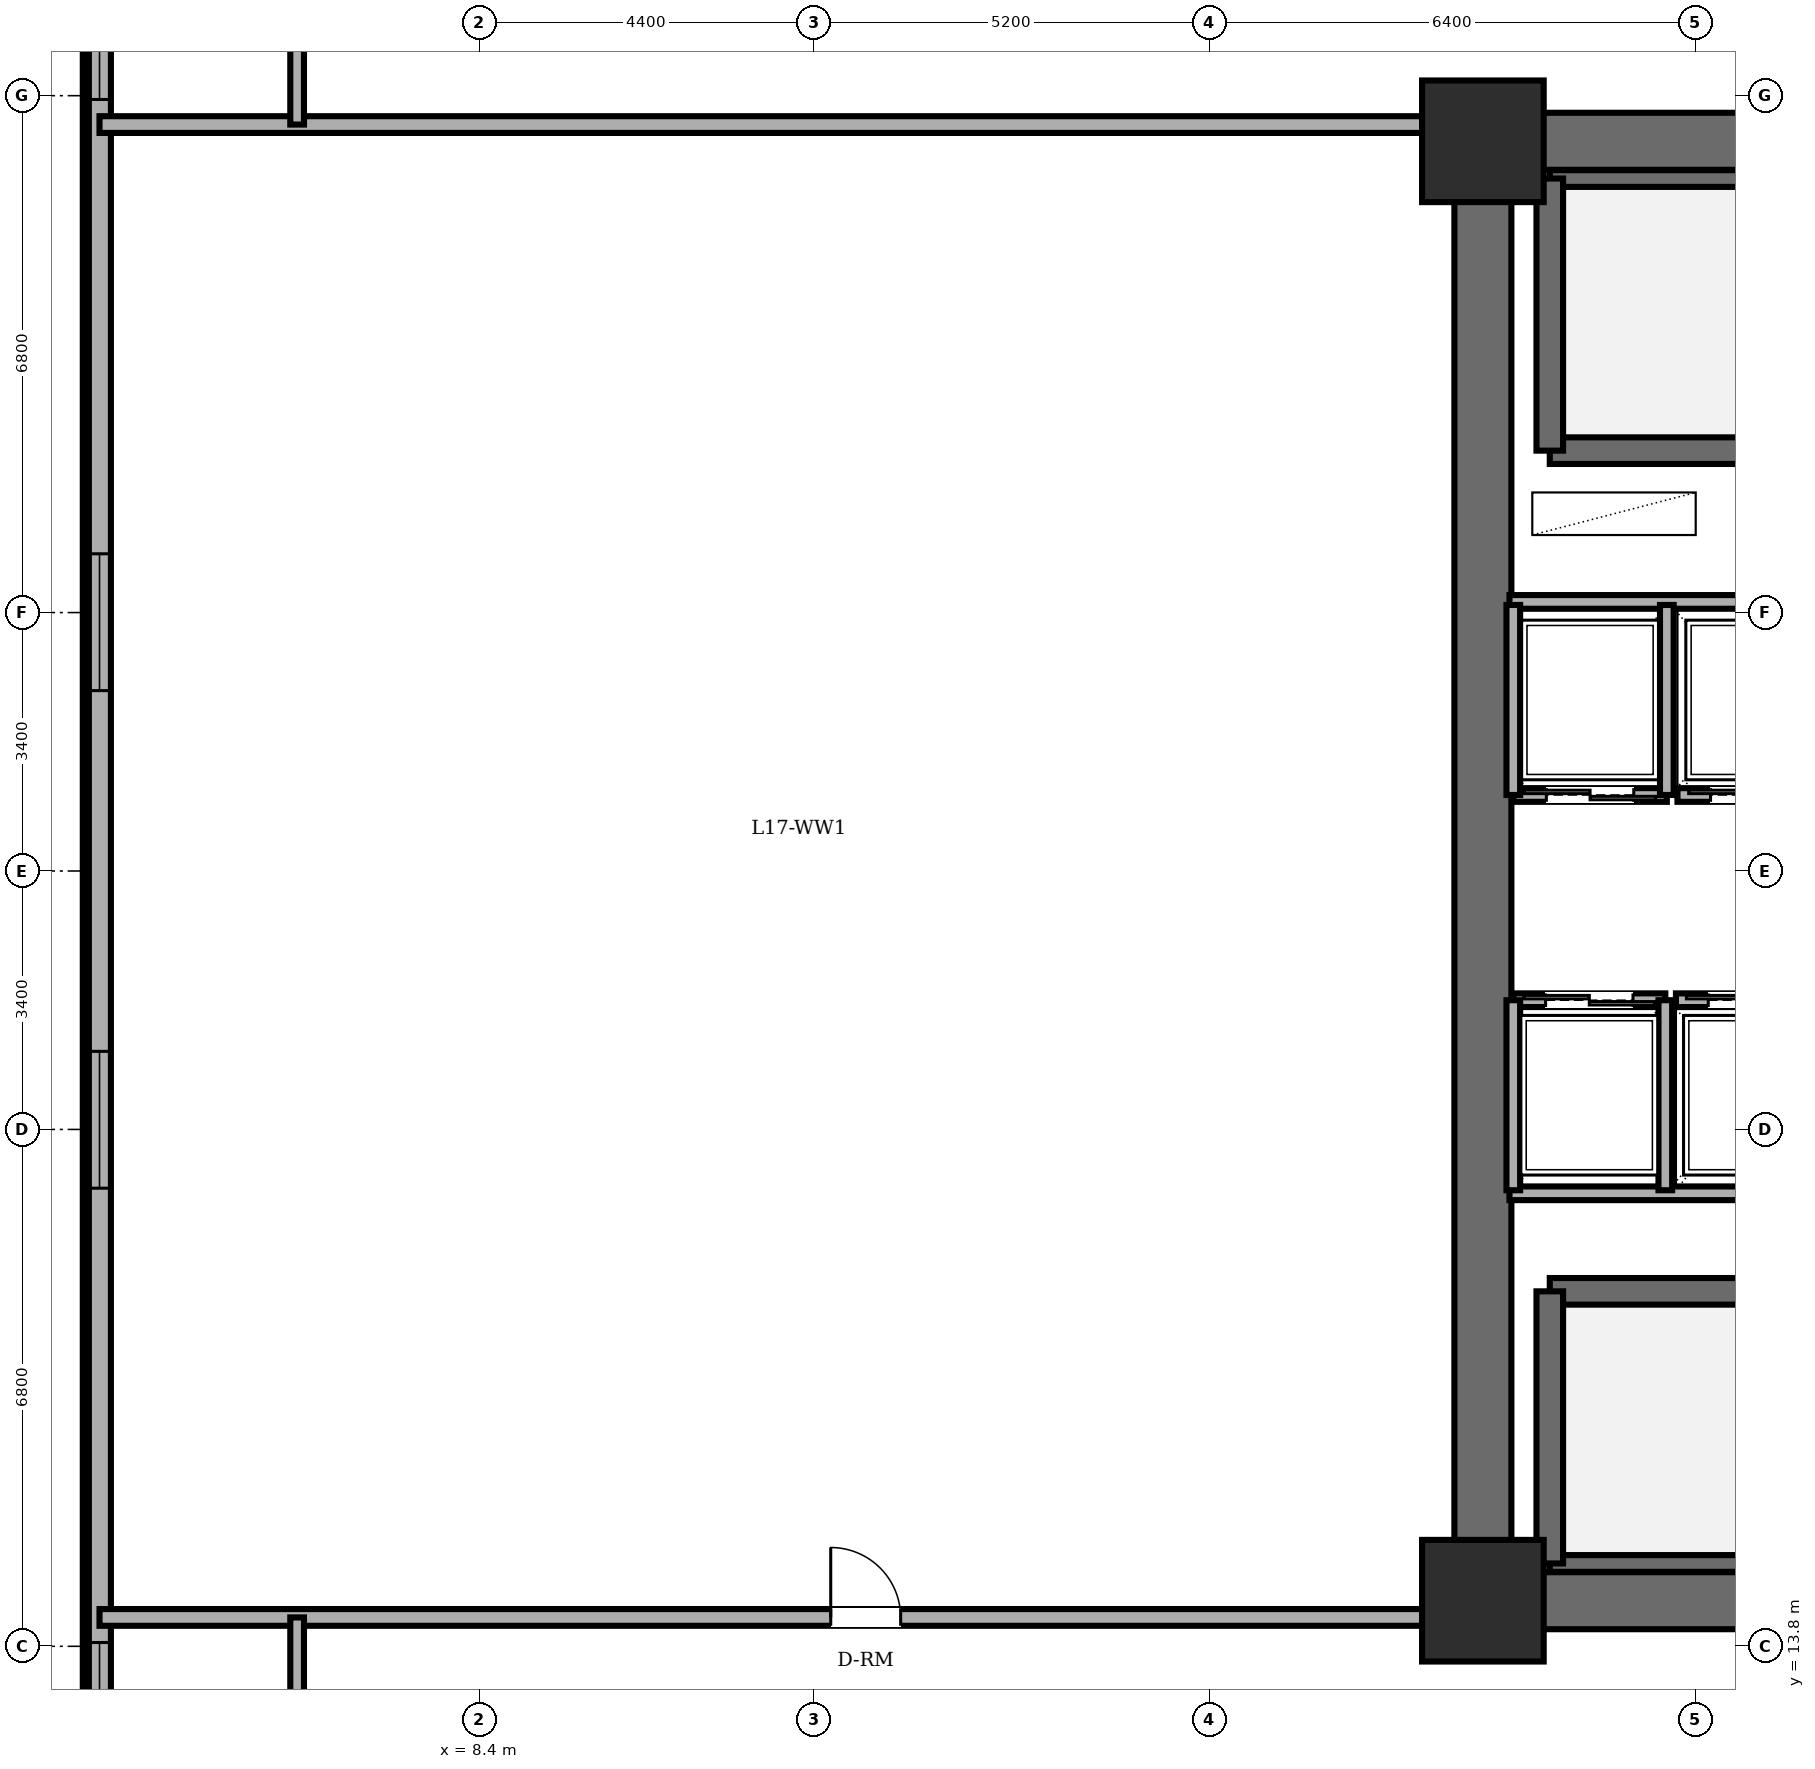
"""IFC4 building model, lengths in metres.
Left out: names, types, materials, properties, quantities, classifications, styles, units other than length and angle.
Written with IfcOpenShell. Run it as: python <this file> out.ifc"""

import sys

from ifc_helpers import new_model, si_unit, direction, frame, frame_2d, origin, origin_2d, place, context, subcontext, project, spatial, rectangle, extrude, element, fill, save


model = new_model("IFC4")
c1 = context("Model", 3, precision=1e-05, world=origin(), true_north=direction((0.0, 1.0)))
c2 = subcontext(c1, "Body", "Model", "MODEL_VIEW")
j1 = project(units=[si_unit("LENGTHUNIT", "METRE"), si_unit("PLANEANGLEUNIT", "RADIAN")], contexts=[c1])
p1 = place(None, origin())
s1 = spatial("IfcSite", under=j1, at=p1, CompositionType="ELEMENT")
p2 = place(p1, origin())
s2 = spatial("IfcBuilding", under=s1, at=p2, CompositionType="ELEMENT")
p3 = place(p2, frame((0.0, 0.0, 64.8)))
s3 = spatial("IfcBuildingStorey", under=s2, at=p3, CompositionType="ELEMENT", Elevation=64.8)
for number, where, z_axis, x_axis in (
    (1, (21.6, 14.4, 0.0), (0.0, 0.0, 1.0), (1.0, 0.0, 0.0)),
    (2, (21.6, 33.6, 0.0), (0.0, 0.0, 1.0), (1.0, 0.0, 0.0)),
):
    element("IfcColumn", number, at=place(p3, frame(where, z_axis=z_axis, x_axis=x_axis)), inside=s3, PredefinedType="COLUMN", context=c2, shape_type="SweptSolid", body=[
        extrude(rectangle(XDim=1.6, YDim=1.6, at=origin_2d()), origin(), (0.0, 0.0, 1.0), 3.6),
    ])
p4 = place(p3, frame((3.4, 40.2, 0.0), z_axis=(0.0, 0.0, 1.0), x_axis=(0.0, -1.0, 0.0)))
e3 = element("IfcWall", 3, at=p4, inside=s3, PredefinedType="SOLIDWALL", context=c2, shape_type="SweptSolid", body=[
    extrude(rectangle(XDim=32.4, YDim=0.3, at=frame_2d((16.2, 0.0))), origin(), (0.0, 0.0, 1.0), 3.4),
])
p5 = place(p4, frame((1.235, 0.0, 0.85)))
e4 = element("IfcOpeningElement", 4, at=p5, cuts=e3, PredefinedType="OPENING", context=c2, shape_type="SweptSolid", body=[
    extrude(rectangle(XDim=1.8, YDim=1.55, at=frame_2d((0.9, 0.775))), frame((0.0, 0.16, 0.0), z_axis=(0.0, -1.0, 0.0), x_axis=(1.0, 0.0, 0.0)), (0.0, 0.0, 1.0), 0.32),
])
p6 = place(p4, frame((4.25, 0.0, 0.85)))
e5 = element("IfcOpeningElement", 5, at=p6, cuts=e3, PredefinedType="OPENING", context=c2, shape_type="SweptSolid", body=[
    extrude(rectangle(XDim=1.8, YDim=1.55, at=frame_2d((0.9, 0.775))), frame((0.0, 0.16, 0.0), z_axis=(0.0, -1.0, 0.0), x_axis=(1.0, 0.0, 0.0)), (0.0, 0.0, 1.0), 0.32),
])
p7 = place(p4, frame((12.027, 0.0, 0.85)))
e6 = element("IfcOpeningElement", 6, at=p7, cuts=e3, PredefinedType="OPENING", context=c2, shape_type="SweptSolid", body=[
    extrude(rectangle(XDim=1.8, YDim=1.55, at=frame_2d((0.9, 0.775))), frame((0.0, 0.16, 0.0), z_axis=(0.0, -1.0, 0.0), x_axis=(1.0, 0.0, 0.0)), (0.0, 0.0, 1.0), 0.32),
])
p8 = place(p4, frame((18.573, 0.0, 0.85)))
e7 = element("IfcOpeningElement", 7, at=p8, cuts=e3, PredefinedType="OPENING", context=c2, shape_type="SweptSolid", body=[
    extrude(rectangle(XDim=1.8, YDim=1.55, at=frame_2d((0.9, 0.775))), frame((0.0, 0.16, 0.0), z_axis=(0.0, -1.0, 0.0), x_axis=(1.0, 0.0, 0.0)), (0.0, 0.0, 1.0), 0.32),
])
p9 = place(p4, frame((26.35, 0.0, 0.85)))
e8 = element("IfcOpeningElement", 8, at=p9, cuts=e3, PredefinedType="OPENING", context=c2, shape_type="SweptSolid", body=[
    extrude(rectangle(XDim=1.8, YDim=1.55, at=frame_2d((0.9, 0.775))), frame((0.0, 0.16, 0.0), z_axis=(0.0, -1.0, 0.0), x_axis=(1.0, 0.0, 0.0)), (0.0, 0.0, 1.0), 0.32),
])
p10 = place(p4, frame((29.365, 0.0, 0.85)))
e9 = element("IfcOpeningElement", 9, at=p10, cuts=e3, PredefinedType="OPENING", context=c2, shape_type="SweptSolid", body=[
    extrude(rectangle(XDim=1.8, YDim=1.55, at=frame_2d((0.9, 0.775))), frame((0.0, 0.16, 0.0), z_axis=(0.0, -1.0, 0.0), x_axis=(1.0, 0.0, 0.0)), (0.0, 0.0, 1.0), 0.32),
])
p11 = place(p3, frame((21.6, 14.4, 0.0), z_axis=(0.0, 0.0, 1.0), x_axis=(0.0, 1.0, 0.0)))
e10 = element("IfcWall", 10, at=p11, inside=s3, PredefinedType="SHEAR", context=c2, shape_type="SweptSolid", body=[
    extrude(rectangle(XDim=19.2, YDim=0.75, at=frame_2d((9.6, 0.0))), origin(), (0.0, 0.0, 1.0), 3.4),
])
for number, where, z_axis, x_axis in (
    (11, (21.6, 33.6, 0.0), (0.0, 0.0, 1.0), (1.0, 0.0, 0.0)),
    (12, (37.2, 14.4, 0.0), (0.0, 0.0, 1.0), (-1.0, 0.0, 0.0)),
):
    element("IfcWall", number, at=place(p3, frame(where, z_axis=z_axis, x_axis=x_axis)), inside=s3, PredefinedType="SHEAR", context=c2, shape_type="SweptSolid", body=[
        extrude(rectangle(XDim=15.6, YDim=0.75, at=frame_2d((7.8, 0.0))), origin(), (0.0, 0.0, 1.0), 3.4),
    ])
p12 = place(p3, frame((22.48, 29.53, 0.0), z_axis=(0.0, 0.0, 1.0), x_axis=(1.0, 0.0, 0.0)))
e13 = element("IfcWall", 13, at=p12, inside=s3, PredefinedType="SOLIDWALL", context=c2, shape_type="SweptSolid", body=[
    extrude(rectangle(XDim=7.79, YDim=0.35, at=frame_2d((3.895, 0.0))), origin(), (0.0, 0.0, 1.0), 3.4),
])
p13 = place(p3, frame((22.48, 33.11, 0.0), z_axis=(0.0, 0.0, 1.0), x_axis=(1.0, 0.0, 0.0)))
e14 = element("IfcWall", 14, at=p13, inside=s3, PredefinedType="PARTITIONING", context=c2, shape_type="SweptSolid", body=[
    extrude(rectangle(XDim=7.79, YDim=0.22, at=frame_2d((3.895, 0.0))), origin(), (0.0, 0.0, 1.0), 3.4),
])
p14 = place(p3, frame((22.48, 29.53, 0.0), z_axis=(0.0, 0.0, 1.0), x_axis=(0.0, 1.0, 0.0)))
e15 = element("IfcWall", 15, at=p14, inside=s3, PredefinedType="SOLIDWALL", context=c2, shape_type="SweptSolid", body=[
    extrude(rectangle(XDim=3.58, YDim=0.35, at=frame_2d((1.79, 0.0))), origin(), (0.0, 0.0, 1.0), 3.4),
])
p15 = place(p3, frame((22.48, 18.47, 0.0), z_axis=(0.0, 0.0, 1.0), x_axis=(1.0, 0.0, 0.0)))
e16 = element("IfcWall", 16, at=p15, inside=s3, PredefinedType="SOLIDWALL", context=c2, shape_type="SweptSolid", body=[
    extrude(rectangle(XDim=7.79, YDim=0.35, at=frame_2d((3.895, 0.0))), origin(), (0.0, 0.0, 1.0), 3.4),
])
p16 = place(p3, frame((22.48, 14.89, 0.0), z_axis=(0.0, 0.0, 1.0), x_axis=(1.0, 0.0, 0.0)))
e17 = element("IfcWall", 17, at=p16, inside=s3, PredefinedType="PARTITIONING", context=c2, shape_type="SweptSolid", body=[
    extrude(rectangle(XDim=7.79, YDim=0.22, at=frame_2d((3.895, 0.0))), origin(), (0.0, 0.0, 1.0), 3.4),
])
p17 = place(p3, frame((22.48, 14.89, 0.0), z_axis=(0.0, 0.0, 1.0), x_axis=(0.0, 1.0, 0.0)))
e18 = element("IfcWall", 18, at=p17, inside=s3, PredefinedType="SOLIDWALL", context=c2, shape_type="SweptSolid", body=[
    extrude(rectangle(XDim=3.58, YDim=0.35, at=frame_2d((1.79, 0.0))), origin(), (0.0, 0.0, 1.0), 3.4),
])
p18 = place(p3, frame((21.95, 27.54, 0.0), z_axis=(0.0, 0.0, 1.0), x_axis=(1.0, 0.0, 0.0)))
e19 = element("IfcWall", 19, at=p18, inside=s3, PredefinedType="PARTITIONING", context=c2, shape_type="SweptSolid", body=[
    extrude(rectangle(XDim=10.56, YDim=0.18, at=frame_2d((5.28, 0.0))), origin(), (0.0, 0.0, 1.0), 3.4),
])
p19 = place(p3, frame((21.95, 19.76, 0.0), z_axis=(0.0, 0.0, 1.0), x_axis=(1.0, 0.0, 0.0)))
e20 = element("IfcWall", 20, at=p19, inside=s3, PredefinedType="PARTITIONING", context=c2, shape_type="SweptSolid", body=[
    extrude(rectangle(XDim=14.87, YDim=0.18, at=frame_2d((7.435, 0.0))), origin(), (0.0, 0.0, 1.0), 3.4),
])
p20 = place(p3, frame((24.02, 25.0, 0.0), z_axis=(0.0, 0.0, 1.0), x_axis=(-1.0, 0.0, 0.0)))
e21 = element("IfcWall", 21, at=p20, inside=s3, PredefinedType="PARTITIONING", context=c2, shape_type="SweptSolid", body=[
    extrude(rectangle(XDim=2.02, YDim=0.18, at=frame_2d((1.01, 0.0))), origin(), (0.0, 0.0, 1.0), 3.4),
])
p21 = place(p20, frame((0.435, 0.0, 0.0)))
e22 = element("IfcOpeningElement", 22, at=p21, cuts=e21, PredefinedType="OPENING", context=c2, shape_type="SweptSolid", body=[
    extrude(rectangle(XDim=1.15, YDim=2.2, at=frame_2d((0.575, 1.1))), frame((0.0, 0.1, 0.0), z_axis=(0.0, -1.0, 0.0), x_axis=(1.0, 0.0, 0.0)), (0.0, 0.0, 1.0), 0.2),
])
for number, where, z_axis, x_axis in (
    (23, (24.02, 25.0, 0.0), (0.0, 0.0, 1.0), (0.0, 1.0, 0.0)),
    (24, (22.0, 27.5, 0.0), (0.0, 0.0, 1.0), (0.0, -1.0, 0.0)),
):
    element("IfcWall", number, at=place(p3, frame(where, z_axis=z_axis, x_axis=x_axis)), inside=s3, PredefinedType="PARTITIONING", context=c2, shape_type="SweptSolid", body=[
        extrude(rectangle(XDim=2.5, YDim=0.18, at=frame_2d((1.25, 0.0))), origin(), (0.0, 0.0, 1.0), 3.4),
    ])
p22 = place(p3, frame((26.18, 25.0, 0.0), z_axis=(0.0, 0.0, 1.0), x_axis=(-1.0, 0.0, 0.0)))
e25 = element("IfcWall", 25, at=p22, inside=s3, PredefinedType="PARTITIONING", context=c2, shape_type="SweptSolid", body=[
    extrude(rectangle(XDim=2.02, YDim=0.18, at=frame_2d((1.01, 0.0))), origin(), (0.0, 0.0, 1.0), 3.4),
])
p23 = place(p22, frame((0.435, 0.0, 0.0)))
e26 = element("IfcOpeningElement", 26, at=p23, cuts=e25, PredefinedType="OPENING", context=c2, shape_type="SweptSolid", body=[
    extrude(rectangle(XDim=1.15, YDim=2.2, at=frame_2d((0.575, 1.1))), frame((0.0, 0.1, 0.0), z_axis=(0.0, -1.0, 0.0), x_axis=(1.0, 0.0, 0.0)), (0.0, 0.0, 1.0), 0.2),
])
p24 = place(p3, frame((22.0, 22.3, 0.0), z_axis=(0.0, 0.0, 1.0), x_axis=(1.0, 0.0, 0.0)))
e27 = element("IfcWall", 27, at=p24, inside=s3, PredefinedType="PARTITIONING", context=c2, shape_type="SweptSolid", body=[
    extrude(rectangle(XDim=2.0, YDim=0.18, at=frame_2d((1.0, 0.0))), origin(), (0.0, 0.0, 1.0), 3.4),
])
p25 = place(p24, frame((0.425, 0.0, 0.0)))
e28 = element("IfcOpeningElement", 28, at=p25, cuts=e27, PredefinedType="OPENING", context=c2, shape_type="SweptSolid", body=[
    extrude(rectangle(XDim=1.15, YDim=2.2, at=frame_2d((0.575, 1.1))), frame((0.0, 0.1, 0.0), z_axis=(0.0, -1.0, 0.0), x_axis=(1.0, 0.0, 0.0)), (0.0, 0.0, 1.0), 0.2),
])
for number, where, z_axis, x_axis in (
    (29, (24.0, 19.8, 0.0), (0.0, 0.0, 1.0), (0.0, 1.0, 0.0)),
    (30, (22.0, 22.3, 0.0), (0.0, 0.0, 1.0), (0.0, -1.0, 0.0)),
):
    element("IfcWall", number, at=place(p3, frame(where, z_axis=z_axis, x_axis=x_axis)), inside=s3, PredefinedType="PARTITIONING", context=c2, shape_type="SweptSolid", body=[
        extrude(rectangle(XDim=2.5, YDim=0.18, at=frame_2d((1.25, 0.0))), origin(), (0.0, 0.0, 1.0), 3.4),
    ])
p26 = place(p3, frame((24.14, 22.3, 0.0), z_axis=(0.0, 0.0, 1.0), x_axis=(1.0, 0.0, 0.0)))
e31 = element("IfcWall", 31, at=p26, inside=s3, PredefinedType="PARTITIONING", context=c2, shape_type="SweptSolid", body=[
    extrude(rectangle(XDim=2.0, YDim=0.18, at=frame_2d((1.0, 0.0))), origin(), (0.0, 0.0, 1.0), 3.4),
])
p27 = place(p26, frame((0.425, 0.0, 0.0)))
e32 = element("IfcOpeningElement", 32, at=p27, cuts=e31, PredefinedType="OPENING", context=c2, shape_type="SweptSolid", body=[
    extrude(rectangle(XDim=1.15, YDim=2.2, at=frame_2d((0.575, 1.1))), frame((0.0, 0.1, 0.0), z_axis=(0.0, -1.0, 0.0), x_axis=(1.0, 0.0, 0.0)), (0.0, 0.0, 1.0), 0.2),
])
p28 = place(p3, frame((3.4, 14.18, 0.0), z_axis=(0.0, 0.0, 1.0), x_axis=(1.0, 0.0, 0.0)))
e33 = element("IfcWall", 33, at=p28, inside=s3, PredefinedType="PARTITIONING", context=c2, shape_type="SweptSolid", body=[
    extrude(rectangle(XDim=18.08, YDim=0.22, at=frame_2d((9.04, 0.0))), origin(), (0.0, 0.0, 1.0), 3.4),
])
p29 = place(p28, frame((9.62, 0.0, 0.0)))
e34 = element("IfcOpeningElement", 34, at=p29, cuts=e33, PredefinedType="OPENING", context=c2, shape_type="SweptSolid", body=[
    extrude(rectangle(XDim=0.92, YDim=2.1, at=frame_2d((0.46, 1.05))), frame((0.0, 0.12, 0.0), z_axis=(0.0, -1.0, 0.0), x_axis=(1.0, 0.0, 0.0)), (0.0, 0.0, 1.0), 0.24),
])
p30 = place(p3, frame((3.4, 33.82, 0.0), z_axis=(0.0, 0.0, 1.0), x_axis=(1.0, 0.0, 0.0)))
e35 = element("IfcWall", 35, at=p30, inside=s3, PredefinedType="PARTITIONING", context=c2, shape_type="SweptSolid", body=[
    extrude(rectangle(XDim=18.08, YDim=0.22, at=frame_2d((9.04, 0.0))), origin(), (0.0, 0.0, 1.0), 3.4),
])
for number, where, z_axis, x_axis in (
    (36, (6.0, 11.72, 0.0), (0.0, 0.0, 1.0), (0.0, 1.0, 0.0)),
    (37, (6.0, 33.82, 0.0), (0.0, 0.0, 1.0), (0.0, 1.0, 0.0)),
):
    element("IfcWall", number, at=place(p3, frame(where, z_axis=z_axis, x_axis=x_axis)), inside=s3, PredefinedType="PARTITIONING", context=c2, shape_type="SweptSolid", body=[
        extrude(rectangle(XDim=2.46, YDim=0.18, at=frame_2d((1.23, 0.0))), origin(), (0.0, 0.0, 1.0), 3.4),
    ])
p31 = place(p6, origin())
e38 = element("IfcWindow", 38, at=p31, inside=s3, PartitioningType="DOUBLE_PANEL_VERTICAL", PredefinedType="WINDOW", context=c2, shape_type="SweptSolid", body=[
    extrude(rectangle(XDim=1.8, YDim=1.55, at=frame_2d((0.9, 0.775))), frame((0.0, 0.03, 0.0), z_axis=(0.0, -1.0, 0.0), x_axis=(1.0, 0.0, 0.0)), (0.0, 0.0, 1.0), 0.06),
])
fill(e5, e38)
p32 = place(p7, origin())
e39 = element("IfcWindow", 39, at=p32, inside=s3, PartitioningType="DOUBLE_PANEL_VERTICAL", PredefinedType="WINDOW", context=c2, shape_type="SweptSolid", body=[
    extrude(rectangle(XDim=1.8, YDim=1.55, at=frame_2d((0.9, 0.775))), frame((0.0, 0.03, 0.0), z_axis=(0.0, -1.0, 0.0), x_axis=(1.0, 0.0, 0.0)), (0.0, 0.0, 1.0), 0.06),
])
fill(e6, e39)
p33 = place(p8, origin())
e40 = element("IfcWindow", 40, at=p33, inside=s3, PartitioningType="DOUBLE_PANEL_VERTICAL", PredefinedType="WINDOW", context=c2, shape_type="SweptSolid", body=[
    extrude(rectangle(XDim=1.8, YDim=1.55, at=frame_2d((0.9, 0.775))), frame((0.0, 0.03, 0.0), z_axis=(0.0, -1.0, 0.0), x_axis=(1.0, 0.0, 0.0)), (0.0, 0.0, 1.0), 0.06),
])
fill(e7, e40)
p34 = place(p9, origin())
e41 = element("IfcWindow", 41, at=p34, inside=s3, PartitioningType="DOUBLE_PANEL_VERTICAL", PredefinedType="WINDOW", context=c2, shape_type="SweptSolid", body=[
    extrude(rectangle(XDim=1.8, YDim=1.55, at=frame_2d((0.9, 0.775))), frame((0.0, 0.03, 0.0), z_axis=(0.0, -1.0, 0.0), x_axis=(1.0, 0.0, 0.0)), (0.0, 0.0, 1.0), 0.06),
])
fill(e8, e41)
p35 = place(p21, origin())
e42 = element("IfcDoor", 42, at=p35, inside=s3, OperationType="DOUBLE_DOOR_SLIDING", PredefinedType="DOOR", context=c2, shape_type="SweptSolid", body=[
    extrude(rectangle(XDim=1.15, YDim=2.2, at=frame_2d((0.575, 1.1))), frame((0.0, 0.025, 0.0), z_axis=(0.0, -1.0, 0.0), x_axis=(1.0, 0.0, 0.0)), (0.0, 0.0, 1.0), 0.05),
])
fill(e22, e42)
p36 = place(p23, origin())
e43 = element("IfcDoor", 43, at=p36, inside=s3, OperationType="DOUBLE_DOOR_SLIDING", PredefinedType="DOOR", context=c2, shape_type="SweptSolid", body=[
    extrude(rectangle(XDim=1.15, YDim=2.2, at=frame_2d((0.575, 1.1))), frame((0.0, 0.025, 0.0), z_axis=(0.0, -1.0, 0.0), x_axis=(1.0, 0.0, 0.0)), (0.0, 0.0, 1.0), 0.05),
])
fill(e26, e43)
p37 = place(p25, origin())
e44 = element("IfcDoor", 44, at=p37, inside=s3, OperationType="DOUBLE_DOOR_SLIDING", PredefinedType="DOOR", context=c2, shape_type="SweptSolid", body=[
    extrude(rectangle(XDim=1.15, YDim=2.2, at=frame_2d((0.575, 1.1))), frame((0.0, 0.025, 0.0), z_axis=(0.0, -1.0, 0.0), x_axis=(1.0, 0.0, 0.0)), (0.0, 0.0, 1.0), 0.05),
])
fill(e28, e44)
p38 = place(p27, origin())
e45 = element("IfcDoor", 45, at=p38, inside=s3, OperationType="DOUBLE_DOOR_SLIDING", PredefinedType="DOOR", context=c2, shape_type="SweptSolid", body=[
    extrude(rectangle(XDim=1.15, YDim=2.2, at=frame_2d((0.575, 1.1))), frame((0.0, 0.025, 0.0), z_axis=(0.0, -1.0, 0.0), x_axis=(1.0, 0.0, 0.0)), (0.0, 0.0, 1.0), 0.05),
])
fill(e32, e45)
p39 = place(p29, origin())
e46 = element("IfcDoor", 46, at=p39, inside=s3, OperationType="SINGLE_SWING_LEFT", PredefinedType="DOOR", context=c2, shape_type="SweptSolid", body=[
    extrude(rectangle(XDim=0.92, YDim=2.1, at=frame_2d((0.46, 1.05))), frame((0.0, 0.025, 0.0), z_axis=(0.0, -1.0, 0.0), x_axis=(1.0, 0.0, 0.0)), (0.0, 0.0, 1.0), 0.05),
])
fill(e34, e46)
save(model, sys.argv[1])
